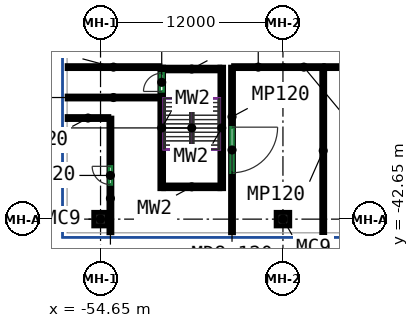
"""IFC4 building model, lengths in metres.
Left out: names, types, materials, properties, quantities, classifications, styles, units other than length and angle.
Written with IfcOpenShell. Run it as: python <this file> out.ifc"""

import sys

from ifc_helpers import new_model, si_unit, direction, frame, frame_2d, origin, origin_2d, place, context, subcontext, project, spatial, rectangle, extrude, source, transform, mapped, element, fill, save


model = new_model("IFC4")
c1 = context("Model", 3, precision=1e-05, world=origin(), true_north=direction((0.0, 1.0)))
c2 = subcontext(c1, "Body", "Model", "MODEL_VIEW")
j1 = project(units=[si_unit("LENGTHUNIT", "METRE"), si_unit("PLANEANGLEUNIT", "RADIAN")], contexts=[c1])
p1 = place(None, origin())
s1 = spatial("IfcSite", under=j1, at=p1, CompositionType="ELEMENT")
p2 = place(p1, origin())
s2 = spatial("IfcBuilding", under=s1, at=p2, CompositionType="ELEMENT")
p3 = place(p2, origin())
s3 = spatial("IfcBuildingStorey", under=s2, at=p3, CompositionType="ELEMENT", Elevation=0.0)
m1 = source(origin(), c2, "Body", "SweptSolid", [
    extrude(rectangle(XDim=0.9, YDim=0.9, at=origin_2d()), origin(), (0.0, 0.0, 1.0), 8.6),
])
for number, where, z_axis, x_axis in (
    (1, (-54.65, -42.65, 0.0), (0.0, 0.0, 1.0), (1.0, 0.0, 0.0)),
    (2, (-42.65, -42.65, 0.0), (0.0, 0.0, 1.0), (1.0, 0.0, 0.0)),
):
    element("IfcColumn", number, at=place(p3, frame(where, z_axis=z_axis, x_axis=x_axis)), inside=s3, PredefinedType="COLUMN", context=c2, shape_type="MappedRepresentation", body=[
        mapped(m1, transform((0.0, 0.0, 0.0))),
    ])
m2 = source(origin(), c2, "Body", "SweptSolid", [
    extrude(rectangle(XDim=8.0, YDim=0.25, at=frame_2d((4.0, 0.0))), origin(), (0.0, 0.0, 1.0), 8.6),
])
p4 = place(p3, frame((-50.625, -40.65, 0.0), z_axis=(0.0, 0.0, 1.0), x_axis=(0.0, 1.0, 0.0)))
e3 = element("IfcWall", 3, at=p4, inside=s3, PredefinedType="SHEAR", context=c2, shape_type="MappedRepresentation", body=[
    mapped(m2, transform((0.0, 0.0, 0.0))),
])
p5 = place(p4, frame((6.4, 0.0, 0.0)))
e4 = element("IfcOpeningElement", 4, at=p5, cuts=e3, PredefinedType="OPENING", context=c2, shape_type="SweptSolid", body=[
    extrude(rectangle(XDim=1.2, YDim=2.1, at=frame_2d((0.6, 1.05))), frame((0.0, 0.135, 0.0), z_axis=(0.0, -1.0, 0.0), x_axis=(1.0, 0.0, 0.0)), (0.0, 0.0, 1.0), 0.27),
])
p6 = place(p3, frame((-46.675, -40.65, 0.0), z_axis=(0.0, 0.0, 1.0), x_axis=(0.0, 1.0, 0.0)))
e5 = element("IfcWall", 5, at=p6, inside=s3, PredefinedType="SHEAR", context=c2, shape_type="MappedRepresentation", body=[
    mapped(m2, transform((0.0, 0.0, 0.0))),
])
m3 = source(origin(), c2, "Body", "SweptSolid", [
    extrude(rectangle(XDim=3.7, YDim=0.25, at=frame_2d((1.85, 0.0))), origin(), (0.0, 0.0, 1.0), 8.6),
])
for number, where, z_axis, x_axis in (
    (6, (-50.5, -40.525, 0.0), (0.0, 0.0, 1.0), (1.0, 0.0, 0.0)),
    (7, (-50.5, -32.775, 0.0), (0.0, 0.0, 1.0), (1.0, 0.0, 0.0)),
):
    element("IfcWall", number, at=place(p3, frame(where, z_axis=z_axis, x_axis=x_axis)), inside=s3, PredefinedType="SHEAR", context=c2, shape_type="MappedRepresentation", body=[
        mapped(m3, transform((0.0, 0.0, 0.0))),
    ])
m4 = source(origin(), c2, "Body", "SweptSolid", [
    extrude(rectangle(XDim=100.7, YDim=0.3, at=frame_2d((50.35, 0.0))), origin(), (0.0, 0.0, 1.0), 8.6),
])
p7 = place(p3, frame((-57.0, -43.55, 0.0), z_axis=(0.0, 0.0, 1.0), x_axis=(0.0, 1.0, 0.0)))
e8 = element("IfcWall", 8, at=p7, inside=s3, PredefinedType="SOLIDWALL", context=c2, shape_type="MappedRepresentation", body=[
    mapped(m4, transform((0.0, 0.0, 0.0))),
])
p8 = place(p7, frame((9.15, 0.0, 0.0)))
e9 = element("IfcOpeningElement", 9, at=p8, cuts=e8, PredefinedType="OPENING", context=c2, shape_type="SweptSolid", body=[
    extrude(rectangle(XDim=1.5, YDim=2.4, at=frame_2d((0.75, 1.2))), frame((0.0, 0.16, 0.0), z_axis=(0.0, -1.0, 0.0), x_axis=(1.0, 0.0, 0.0)), (0.0, 0.0, 1.0), 0.32),
])
p9 = place(p7, frame((29.25, 0.0, 0.0)))
e10 = element("IfcOpeningElement", 10, at=p9, cuts=e8, PredefinedType="OPENING", context=c2, shape_type="SweptSolid", body=[
    extrude(rectangle(XDim=1.5, YDim=2.4, at=frame_2d((0.75, 1.2))), frame((0.0, 0.16, 0.0), z_axis=(0.0, -1.0, 0.0), x_axis=(1.0, 0.0, 0.0)), (0.0, 0.0, 1.0), 0.32),
])
p10 = place(p7, frame((49.45, 0.0, 0.0)))
e11 = element("IfcOpeningElement", 11, at=p10, cuts=e8, PredefinedType="OPENING", context=c2, shape_type="SweptSolid", body=[
    extrude(rectangle(XDim=1.5, YDim=2.4, at=frame_2d((0.75, 1.2))), frame((0.0, 0.16, 0.0), z_axis=(0.0, -1.0, 0.0), x_axis=(1.0, 0.0, 0.0)), (0.0, 0.0, 1.0), 0.32),
])
p11 = place(p7, frame((69.65, 0.0, 0.0)))
e12 = element("IfcOpeningElement", 12, at=p11, cuts=e8, PredefinedType="OPENING", context=c2, shape_type="SweptSolid", body=[
    extrude(rectangle(XDim=1.5, YDim=2.4, at=frame_2d((0.75, 1.2))), frame((0.0, 0.16, 0.0), z_axis=(0.0, -1.0, 0.0), x_axis=(1.0, 0.0, 0.0)), (0.0, 0.0, 1.0), 0.32),
])
p12 = place(p7, frame((89.85, 0.0, 0.0)))
e13 = element("IfcOpeningElement", 13, at=p12, cuts=e8, PredefinedType="OPENING", context=c2, shape_type="SweptSolid", body=[
    extrude(rectangle(XDim=1.5, YDim=2.4, at=frame_2d((0.75, 1.2))), frame((0.0, 0.16, 0.0), z_axis=(0.0, -1.0, 0.0), x_axis=(1.0, 0.0, 0.0)), (0.0, 0.0, 1.0), 0.32),
])
p13 = place(p7, frame((3.15, 0.0, 0.6)))
e14 = element("IfcOpeningElement", 14, at=p13, cuts=e8, PredefinedType="OPENING", context=c2, shape_type="SweptSolid", body=[
    extrude(rectangle(XDim=2.4, YDim=3.0, at=frame_2d((1.2, 1.5))), frame((0.0, 0.16, 0.0), z_axis=(0.0, -1.0, 0.0), x_axis=(1.0, 0.0, 0.0)), (0.0, 0.0, 1.0), 0.32),
])
p14 = place(p7, frame((3.15, 0.0, 5.0)))
e15 = element("IfcOpeningElement", 15, at=p14, cuts=e8, PredefinedType="OPENING", context=c2, shape_type="SweptSolid", body=[
    extrude(rectangle(XDim=2.4, YDim=2.0, at=frame_2d((1.2, 1.0))), frame((0.0, 0.16, 0.0), z_axis=(0.0, -1.0, 0.0), x_axis=(1.0, 0.0, 0.0)), (0.0, 0.0, 1.0), 0.32),
])
p15 = place(p7, frame((19.15, 0.0, 0.6)))
e16 = element("IfcOpeningElement", 16, at=p15, cuts=e8, PredefinedType="OPENING", context=c2, shape_type="SweptSolid", body=[
    extrude(rectangle(XDim=2.4, YDim=3.0, at=frame_2d((1.2, 1.5))), frame((0.0, 0.16, 0.0), z_axis=(0.0, -1.0, 0.0), x_axis=(1.0, 0.0, 0.0)), (0.0, 0.0, 1.0), 0.32),
])
p16 = place(p7, frame((19.15, 0.0, 5.0)))
e17 = element("IfcOpeningElement", 17, at=p16, cuts=e8, PredefinedType="OPENING", context=c2, shape_type="SweptSolid", body=[
    extrude(rectangle(XDim=2.4, YDim=2.0, at=frame_2d((1.2, 1.0))), frame((0.0, 0.16, 0.0), z_axis=(0.0, -1.0, 0.0), x_axis=(1.0, 0.0, 0.0)), (0.0, 0.0, 1.0), 0.32),
])
p17 = place(p7, frame((23.15, 0.0, 0.6)))
e18 = element("IfcOpeningElement", 18, at=p17, cuts=e8, PredefinedType="OPENING", context=c2, shape_type="SweptSolid", body=[
    extrude(rectangle(XDim=2.4, YDim=3.0, at=frame_2d((1.2, 1.5))), frame((0.0, 0.16, 0.0), z_axis=(0.0, -1.0, 0.0), x_axis=(1.0, 0.0, 0.0)), (0.0, 0.0, 1.0), 0.32),
])
p18 = place(p7, frame((23.15, 0.0, 5.0)))
e19 = element("IfcOpeningElement", 19, at=p18, cuts=e8, PredefinedType="OPENING", context=c2, shape_type="SweptSolid", body=[
    extrude(rectangle(XDim=2.4, YDim=2.0, at=frame_2d((1.2, 1.0))), frame((0.0, 0.16, 0.0), z_axis=(0.0, -1.0, 0.0), x_axis=(1.0, 0.0, 0.0)), (0.0, 0.0, 1.0), 0.32),
])
p19 = place(p7, frame((39.15, 0.0, 0.6)))
e20 = element("IfcOpeningElement", 20, at=p19, cuts=e8, PredefinedType="OPENING", context=c2, shape_type="SweptSolid", body=[
    extrude(rectangle(XDim=2.4, YDim=3.0, at=frame_2d((1.2, 1.5))), frame((0.0, 0.16, 0.0), z_axis=(0.0, -1.0, 0.0), x_axis=(1.0, 0.0, 0.0)), (0.0, 0.0, 1.0), 0.32),
])
p20 = place(p7, frame((39.15, 0.0, 5.0)))
e21 = element("IfcOpeningElement", 21, at=p20, cuts=e8, PredefinedType="OPENING", context=c2, shape_type="SweptSolid", body=[
    extrude(rectangle(XDim=2.4, YDim=2.0, at=frame_2d((1.2, 1.0))), frame((0.0, 0.16, 0.0), z_axis=(0.0, -1.0, 0.0), x_axis=(1.0, 0.0, 0.0)), (0.0, 0.0, 1.0), 0.32),
])
p21 = place(p7, frame((43.15, 0.0, 0.6)))
e22 = element("IfcOpeningElement", 22, at=p21, cuts=e8, PredefinedType="OPENING", context=c2, shape_type="SweptSolid", body=[
    extrude(rectangle(XDim=2.4, YDim=3.0, at=frame_2d((1.2, 1.5))), frame((0.0, 0.16, 0.0), z_axis=(0.0, -1.0, 0.0), x_axis=(1.0, 0.0, 0.0)), (0.0, 0.0, 1.0), 0.32),
])
p22 = place(p7, frame((43.15, 0.0, 5.0)))
e23 = element("IfcOpeningElement", 23, at=p22, cuts=e8, PredefinedType="OPENING", context=c2, shape_type="SweptSolid", body=[
    extrude(rectangle(XDim=2.4, YDim=2.0, at=frame_2d((1.2, 1.0))), frame((0.0, 0.16, 0.0), z_axis=(0.0, -1.0, 0.0), x_axis=(1.0, 0.0, 0.0)), (0.0, 0.0, 1.0), 0.32),
])
p23 = place(p7, frame((55.15, 0.0, 0.6)))
e24 = element("IfcOpeningElement", 24, at=p23, cuts=e8, PredefinedType="OPENING", context=c2, shape_type="SweptSolid", body=[
    extrude(rectangle(XDim=2.4, YDim=3.0, at=frame_2d((1.2, 1.5))), frame((0.0, 0.16, 0.0), z_axis=(0.0, -1.0, 0.0), x_axis=(1.0, 0.0, 0.0)), (0.0, 0.0, 1.0), 0.32),
])
p24 = place(p7, frame((55.15, 0.0, 5.0)))
e25 = element("IfcOpeningElement", 25, at=p24, cuts=e8, PredefinedType="OPENING", context=c2, shape_type="SweptSolid", body=[
    extrude(rectangle(XDim=2.4, YDim=2.0, at=frame_2d((1.2, 1.0))), frame((0.0, 0.16, 0.0), z_axis=(0.0, -1.0, 0.0), x_axis=(1.0, 0.0, 0.0)), (0.0, 0.0, 1.0), 0.32),
])
p25 = place(p7, frame((59.15, 0.0, 0.6)))
e26 = element("IfcOpeningElement", 26, at=p25, cuts=e8, PredefinedType="OPENING", context=c2, shape_type="SweptSolid", body=[
    extrude(rectangle(XDim=2.4, YDim=3.0, at=frame_2d((1.2, 1.5))), frame((0.0, 0.16, 0.0), z_axis=(0.0, -1.0, 0.0), x_axis=(1.0, 0.0, 0.0)), (0.0, 0.0, 1.0), 0.32),
])
p26 = place(p7, frame((59.15, 0.0, 5.0)))
e27 = element("IfcOpeningElement", 27, at=p26, cuts=e8, PredefinedType="OPENING", context=c2, shape_type="SweptSolid", body=[
    extrude(rectangle(XDim=2.4, YDim=2.0, at=frame_2d((1.2, 1.0))), frame((0.0, 0.16, 0.0), z_axis=(0.0, -1.0, 0.0), x_axis=(1.0, 0.0, 0.0)), (0.0, 0.0, 1.0), 0.32),
])
p27 = place(p7, frame((63.15, 0.0, 0.6)))
e28 = element("IfcOpeningElement", 28, at=p27, cuts=e8, PredefinedType="OPENING", context=c2, shape_type="SweptSolid", body=[
    extrude(rectangle(XDim=2.4, YDim=3.0, at=frame_2d((1.2, 1.5))), frame((0.0, 0.16, 0.0), z_axis=(0.0, -1.0, 0.0), x_axis=(1.0, 0.0, 0.0)), (0.0, 0.0, 1.0), 0.32),
])
p28 = place(p7, frame((63.15, 0.0, 5.0)))
e29 = element("IfcOpeningElement", 29, at=p28, cuts=e8, PredefinedType="OPENING", context=c2, shape_type="SweptSolid", body=[
    extrude(rectangle(XDim=2.4, YDim=2.0, at=frame_2d((1.2, 1.0))), frame((0.0, 0.16, 0.0), z_axis=(0.0, -1.0, 0.0), x_axis=(1.0, 0.0, 0.0)), (0.0, 0.0, 1.0), 0.32),
])
p29 = place(p7, frame((75.15, 0.0, 0.6)))
e30 = element("IfcOpeningElement", 30, at=p29, cuts=e8, PredefinedType="OPENING", context=c2, shape_type="SweptSolid", body=[
    extrude(rectangle(XDim=2.4, YDim=3.0, at=frame_2d((1.2, 1.5))), frame((0.0, 0.16, 0.0), z_axis=(0.0, -1.0, 0.0), x_axis=(1.0, 0.0, 0.0)), (0.0, 0.0, 1.0), 0.32),
])
p30 = place(p7, frame((75.15, 0.0, 5.0)))
e31 = element("IfcOpeningElement", 31, at=p30, cuts=e8, PredefinedType="OPENING", context=c2, shape_type="SweptSolid", body=[
    extrude(rectangle(XDim=2.4, YDim=2.0, at=frame_2d((1.2, 1.0))), frame((0.0, 0.16, 0.0), z_axis=(0.0, -1.0, 0.0), x_axis=(1.0, 0.0, 0.0)), (0.0, 0.0, 1.0), 0.32),
])
p31 = place(p7, frame((79.15, 0.0, 0.6)))
e32 = element("IfcOpeningElement", 32, at=p31, cuts=e8, PredefinedType="OPENING", context=c2, shape_type="SweptSolid", body=[
    extrude(rectangle(XDim=2.4, YDim=3.0, at=frame_2d((1.2, 1.5))), frame((0.0, 0.16, 0.0), z_axis=(0.0, -1.0, 0.0), x_axis=(1.0, 0.0, 0.0)), (0.0, 0.0, 1.0), 0.32),
])
p32 = place(p7, frame((79.15, 0.0, 5.0)))
e33 = element("IfcOpeningElement", 33, at=p32, cuts=e8, PredefinedType="OPENING", context=c2, shape_type="SweptSolid", body=[
    extrude(rectangle(XDim=2.4, YDim=2.0, at=frame_2d((1.2, 1.0))), frame((0.0, 0.16, 0.0), z_axis=(0.0, -1.0, 0.0), x_axis=(1.0, 0.0, 0.0)), (0.0, 0.0, 1.0), 0.32),
])
p33 = place(p7, frame((83.15, 0.0, 0.6)))
e34 = element("IfcOpeningElement", 34, at=p33, cuts=e8, PredefinedType="OPENING", context=c2, shape_type="SweptSolid", body=[
    extrude(rectangle(XDim=2.4, YDim=3.0, at=frame_2d((1.2, 1.5))), frame((0.0, 0.16, 0.0), z_axis=(0.0, -1.0, 0.0), x_axis=(1.0, 0.0, 0.0)), (0.0, 0.0, 1.0), 0.32),
])
p34 = place(p7, frame((83.15, 0.0, 5.0)))
e35 = element("IfcOpeningElement", 35, at=p34, cuts=e8, PredefinedType="OPENING", context=c2, shape_type="SweptSolid", body=[
    extrude(rectangle(XDim=2.4, YDim=2.0, at=frame_2d((1.2, 1.0))), frame((0.0, 0.16, 0.0), z_axis=(0.0, -1.0, 0.0), x_axis=(1.0, 0.0, 0.0)), (0.0, 0.0, 1.0), 0.32),
])
p35 = place(p7, frame((95.15, 0.0, 0.6)))
e36 = element("IfcOpeningElement", 36, at=p35, cuts=e8, PredefinedType="OPENING", context=c2, shape_type="SweptSolid", body=[
    extrude(rectangle(XDim=2.4, YDim=3.0, at=frame_2d((1.2, 1.5))), frame((0.0, 0.16, 0.0), z_axis=(0.0, -1.0, 0.0), x_axis=(1.0, 0.0, 0.0)), (0.0, 0.0, 1.0), 0.32),
])
p36 = place(p7, frame((95.15, 0.0, 5.0)))
e37 = element("IfcOpeningElement", 37, at=p36, cuts=e8, PredefinedType="OPENING", context=c2, shape_type="SweptSolid", body=[
    extrude(rectangle(XDim=2.4, YDim=2.0, at=frame_2d((1.2, 1.0))), frame((0.0, 0.16, 0.0), z_axis=(0.0, -1.0, 0.0), x_axis=(1.0, 0.0, 0.0)), (0.0, 0.0, 1.0), 0.32),
])
m5 = source(origin(), c2, "Body", "SweptSolid", [
    extrude(rectangle(XDim=28.7, YDim=0.3, at=frame_2d((14.35, 0.0))), origin(), (0.0, 0.0, 1.0), 8.6),
])
p37 = place(p3, frame((-28.45, -43.7, 0.0), z_axis=(0.0, 0.0, 1.0), x_axis=(-1.0, 0.0, 0.0)))
e38 = element("IfcWall", 38, at=p37, inside=s3, PredefinedType="SOLIDWALL", context=c2, shape_type="MappedRepresentation", body=[
    mapped(m5, transform((0.0, 0.0, 0.0))),
])
p38 = place(p37, frame((23.8, 0.0, 0.0)))
e39 = element("IfcOpeningElement", 39, at=p38, cuts=e38, PredefinedType="OPENING", context=c2, shape_type="SweptSolid", body=[
    extrude(rectangle(XDim=1.5, YDim=2.4, at=frame_2d((0.75, 1.2))), frame((0.0, 0.16, 0.0), z_axis=(0.0, -1.0, 0.0), x_axis=(1.0, 0.0, 0.0)), (0.0, 0.0, 1.0), 0.32),
])
p39 = place(p37, frame((3.8, 0.0, 0.0)))
e40 = element("IfcOpeningElement", 40, at=p39, cuts=e38, PredefinedType="OPENING", context=c2, shape_type="SweptSolid", body=[
    extrude(rectangle(XDim=1.5, YDim=2.4, at=frame_2d((0.75, 1.2))), frame((0.0, 0.16, 0.0), z_axis=(0.0, -1.0, 0.0), x_axis=(1.0, 0.0, 0.0)), (0.0, 0.0, 1.0), 0.32),
])
p40 = place(p37, frame((15.05, 0.0, 0.0)))
e41 = element("IfcOpeningElement", 41, at=p40, cuts=e38, PredefinedType="OPENING", context=c2, shape_type="SweptSolid", body=[
    extrude(rectangle(XDim=6.0, YDim=4.2, at=frame_2d((3.0, 2.1))), frame((0.0, 0.16, 0.0), z_axis=(0.0, -1.0, 0.0), x_axis=(1.0, 0.0, 0.0)), (0.0, 0.0, 1.0), 0.32),
])
p41 = place(p37, frame((7.15, 0.0, 0.6)))
e42 = element("IfcOpeningElement", 42, at=p41, cuts=e38, PredefinedType="OPENING", context=c2, shape_type="SweptSolid", body=[
    extrude(rectangle(XDim=2.4, YDim=3.0, at=frame_2d((1.2, 1.5))), frame((0.0, 0.16, 0.0), z_axis=(0.0, -1.0, 0.0), x_axis=(1.0, 0.0, 0.0)), (0.0, 0.0, 1.0), 0.32),
])
p42 = place(p37, frame((7.15, 0.0, 5.0)))
e43 = element("IfcOpeningElement", 43, at=p42, cuts=e38, PredefinedType="OPENING", context=c2, shape_type="SweptSolid", body=[
    extrude(rectangle(XDim=2.4, YDim=2.0, at=frame_2d((1.2, 1.0))), frame((0.0, 0.16, 0.0), z_axis=(0.0, -1.0, 0.0), x_axis=(1.0, 0.0, 0.0)), (0.0, 0.0, 1.0), 0.32),
])
m6 = source(origin(), c2, "Body", "SweptSolid", [
    extrude(rectangle(XDim=6.1, YDim=0.2, at=frame_2d((3.05, 0.0))), origin(), (0.0, 0.0, 1.0), 7.7),
])
p43 = place(p3, frame((-56.85, -34.65, 0.0), z_axis=(0.0, 0.0, 1.0), x_axis=(1.0, 0.0, 0.0)))
e44 = element("IfcWall", 44, at=p43, inside=s3, PredefinedType="PARTITIONING", context=c2, shape_type="MappedRepresentation", body=[
    mapped(m6, transform((0.0, 0.0, 0.0))),
])
m7 = source(origin(), c2, "Body", "SweptSolid", [
    extrude(rectangle(XDim=7.55, YDim=0.2, at=frame_2d((3.775, 0.0))), origin(), (0.0, 0.0, 1.0), 7.7),
])
p44 = place(p3, frame((-54.0, -43.55, 0.0), z_axis=(0.0, 0.0, 1.0), x_axis=(0.0, 1.0, 0.0)))
e45 = element("IfcWall", 45, at=p44, inside=s3, PredefinedType="PARTITIONING", context=c2, shape_type="MappedRepresentation", body=[
    mapped(m7, transform((0.0, 0.0, 0.0))),
])
p45 = place(p44, frame((3.175, 0.0, 0.0)))
e46 = element("IfcOpeningElement", 46, at=p45, cuts=e45, PredefinedType="OPENING", context=c2, shape_type="SweptSolid", body=[
    extrude(rectangle(XDim=1.2, YDim=2.1, at=frame_2d((0.6, 1.05))), frame((0.0, 0.11, 0.0), z_axis=(0.0, -1.0, 0.0), x_axis=(1.0, 0.0, 0.0)), (0.0, 0.0, 1.0), 0.22),
])
m8 = source(origin(), c2, "Body", "SweptSolid", [
    extrude(rectangle(XDim=2.75, YDim=0.2, at=frame_2d((1.375, 0.0))), origin(), (0.0, 0.0, 1.0), 7.7),
])
p46 = place(p3, frame((-54.1, -36.0, 0.0), z_axis=(0.0, 0.0, 1.0), x_axis=(-1.0, 0.0, 0.0)))
e47 = element("IfcWall", 47, at=p46, inside=s3, PredefinedType="PARTITIONING", context=c2, shape_type="MappedRepresentation", body=[
    mapped(m8, transform((0.0, 0.0, 0.0))),
])
p47 = place(p3, frame((-50.75, -32.65, 0.0), z_axis=(0.0, 0.0, 1.0), x_axis=(-1.0, 0.0, 0.0)))
e48 = element("IfcWall", 48, at=p47, inside=s3, PredefinedType="PARTITIONING", context=c2, shape_type="MappedRepresentation", body=[
    mapped(m6, transform((0.0, 0.0, 0.0))),
])
m9 = source(origin(), c2, "Body", "SweptSolid", [
    extrude(rectangle(XDim=10.9, YDim=0.2, at=frame_2d((5.45, 0.0))), origin(), (0.0, 0.0, 1.0), 7.7),
])
p48 = place(p3, frame((-46.0, -32.65, 0.0), z_axis=(0.0, 0.0, 1.0), x_axis=(0.0, -1.0, 0.0)))
e49 = element("IfcWall", 49, at=p48, inside=s3, PredefinedType="PARTITIONING", context=c2, shape_type="MappedRepresentation", body=[
    mapped(m9, transform((0.0, 0.0, 0.0))),
])
p49 = place(p48, frame((3.95, 0.0, 0.0)))
e50 = element("IfcOpeningElement", 50, at=p49, cuts=e49, PredefinedType="OPENING", context=c2, shape_type="SweptSolid", body=[
    extrude(rectangle(XDim=3.0, YDim=3.0, at=frame_2d((1.5, 1.5))), frame((0.0, 0.11, 0.0), z_axis=(0.0, -1.0, 0.0), x_axis=(1.0, 0.0, 0.0)), (0.0, 0.0, 1.0), 0.22),
])
m10 = source(origin(), c2, "Body", "SweptSolid", [
    extrude(rectangle(XDim=3.25, YDim=0.2, at=frame_2d((1.625, 0.0))), origin(), (0.0, 0.0, 1.0), 7.7),
])
p50 = place(p3, frame((-42.65, -32.65, 0.0), z_axis=(0.0, 0.0, 1.0), x_axis=(-1.0, 0.0, 0.0)))
e51 = element("IfcWall", 51, at=p50, inside=s3, PredefinedType="PARTITIONING", context=c2, shape_type="MappedRepresentation", body=[
    mapped(m10, transform((0.0, 0.0, 0.0))),
])
m11 = source(origin(), c2, "Body", "SweptSolid", [
    extrude(rectangle(XDim=2.55, YDim=0.2, at=frame_2d((1.275, 0.0))), origin(), (0.0, 0.0, 1.0), 7.7),
])
p51 = place(p3, frame((-40.0, -32.65, 0.0), z_axis=(0.0, 0.0, 1.0), x_axis=(-1.0, 0.0, 0.0)))
e52 = element("IfcWall", 52, at=p51, inside=s3, PredefinedType="PARTITIONING", context=c2, shape_type="MappedRepresentation", body=[
    mapped(m11, transform((0.0, 0.0, 0.0))),
])
m12 = source(origin(), c2, "Body", "SweptSolid", [
    extrude(rectangle(XDim=10.8, YDim=0.2, at=frame_2d((5.4, 0.0))), origin(), (0.0, 0.0, 1.0), 7.7),
])
p52 = place(p3, frame((-40.0, -32.75, 0.0), z_axis=(0.0, 0.0, 1.0), x_axis=(0.0, -1.0, 0.0)))
e53 = element("IfcWall", 53, at=p52, inside=s3, PredefinedType="PARTITIONING", context=c2, shape_type="MappedRepresentation", body=[
    mapped(m12, transform((0.0, 0.0, 0.0))),
])
m13 = source(origin(), c2, "Body", "SweptSolid", [
    extrude(rectangle(XDim=11.45, YDim=0.2, at=frame_2d((5.725, 0.0))), origin(), (0.0, 0.0, 1.0), 7.7),
])
p53 = place(p3, frame((-28.45, -32.65, 0.0), z_axis=(0.0, 0.0, 1.0), x_axis=(-1.0, 0.0, 0.0)))
e54 = element("IfcWall", 54, at=p53, inside=s3, PredefinedType="PARTITIONING", context=c2, shape_type="MappedRepresentation", body=[
    mapped(m13, transform((0.0, 0.0, 0.0))),
])
p54 = place(p53, frame((4.525, 0.0, 0.0)))
e55 = element("IfcOpeningElement", 55, at=p54, cuts=e54, PredefinedType="OPENING", context=c2, shape_type="SweptSolid", body=[
    extrude(rectangle(XDim=2.4, YDim=2.4, at=frame_2d((1.2, 1.2))), frame((0.0, 0.11, 0.0), z_axis=(0.0, -1.0, 0.0), x_axis=(1.0, 0.0, 0.0)), (0.0, 0.0, 1.0), 0.22),
])
p55 = place(p8, origin())
e56 = element("IfcDoor", 56, at=p55, inside=s3, OperationType="DOUBLE_DOOR_SINGLE_SWING", PredefinedType="DOOR", context=c2, shape_type="SweptSolid", body=[
    extrude(rectangle(XDim=1.5, YDim=2.4, at=frame_2d((0.75, 1.2))), frame((0.0, 0.025, 0.0), z_axis=(0.0, -1.0, 0.0), x_axis=(1.0, 0.0, 0.0)), (0.0, 0.0, 1.0), 0.05),
])
fill(e9, e56)
p56 = place(p38, origin())
e57 = element("IfcDoor", 57, at=p56, inside=s3, OperationType="DOUBLE_DOOR_SINGLE_SWING", PredefinedType="DOOR", context=c2, shape_type="SweptSolid", body=[
    extrude(rectangle(XDim=1.5, YDim=2.4, at=frame_2d((0.75, 1.2))), frame((0.0, 0.025, 0.0), z_axis=(0.0, -1.0, 0.0), x_axis=(1.0, 0.0, 0.0)), (0.0, 0.0, 1.0), 0.05),
])
fill(e39, e57)
p57 = place(p40, origin())
e58 = element("IfcDoor", 58, at=p57, inside=s3, OperationType="ROLLINGUP", PredefinedType="DOOR", context=c2, shape_type="SweptSolid", body=[
    extrude(rectangle(XDim=6.0, YDim=4.2, at=frame_2d((3.0, 2.1))), frame((0.0, 0.025, 0.0), z_axis=(0.0, -1.0, 0.0), x_axis=(1.0, 0.0, 0.0)), (0.0, 0.0, 1.0), 0.05),
])
fill(e41, e58)
p58 = place(p13, origin())
e59 = element("IfcWindow", 59, at=p58, inside=s3, PartitioningType="SINGLE_PANEL", PredefinedType="WINDOW", context=c2, shape_type="SweptSolid", body=[
    extrude(rectangle(XDim=2.4, YDim=3.0, at=frame_2d((1.2, 1.5))), frame((0.0, 0.03, 0.0), z_axis=(0.0, -1.0, 0.0), x_axis=(1.0, 0.0, 0.0)), (0.0, 0.0, 1.0), 0.06),
])
fill(e14, e59)
p59 = place(p14, origin())
e60 = element("IfcWindow", 60, at=p59, inside=s3, PartitioningType="SINGLE_PANEL", PredefinedType="WINDOW", context=c2, shape_type="SweptSolid", body=[
    extrude(rectangle(XDim=2.4, YDim=2.0, at=frame_2d((1.2, 1.0))), frame((0.0, 0.03, 0.0), z_axis=(0.0, -1.0, 0.0), x_axis=(1.0, 0.0, 0.0)), (0.0, 0.0, 1.0), 0.06),
])
fill(e15, e60)
p60 = place(p5, origin())
e61 = element("IfcDoor", 61, at=p60, inside=s3, OperationType="DOUBLE_DOOR_SINGLE_SWING", PredefinedType="DOOR", context=c2, shape_type="SweptSolid", body=[
    extrude(rectangle(XDim=1.2, YDim=2.1, at=frame_2d((0.6, 1.05))), frame((0.0, 0.025, 0.0), z_axis=(0.0, -1.0, 0.0), x_axis=(1.0, 0.0, 0.0)), (0.0, 0.0, 1.0), 0.05),
])
fill(e4, e61)
p61 = place(p45, origin())
e62 = element("IfcDoor", 62, at=p61, inside=s3, OperationType="SINGLE_SWING_RIGHT", PredefinedType="DOOR", context=c2, shape_type="SweptSolid", body=[
    extrude(rectangle(XDim=1.2, YDim=2.1, at=frame_2d((0.6, 1.05))), frame((0.0, 0.025, 0.0), z_axis=(0.0, -1.0, 0.0), x_axis=(1.0, 0.0, 0.0)), (0.0, 0.0, 1.0), 0.05),
])
fill(e46, e62)
p62 = place(p49, origin())
e63 = element("IfcDoor", 63, at=p62, inside=s3, OperationType="ROLLINGUP", PredefinedType="DOOR", context=c2, shape_type="SweptSolid", body=[
    extrude(rectangle(XDim=3.0, YDim=3.0, at=frame_2d((1.5, 1.5))), frame((0.0, 0.025, 0.0), z_axis=(0.0, -1.0, 0.0), x_axis=(1.0, 0.0, 0.0)), (0.0, 0.0, 1.0), 0.05),
])
fill(e50, e63)
save(model, sys.argv[1])
